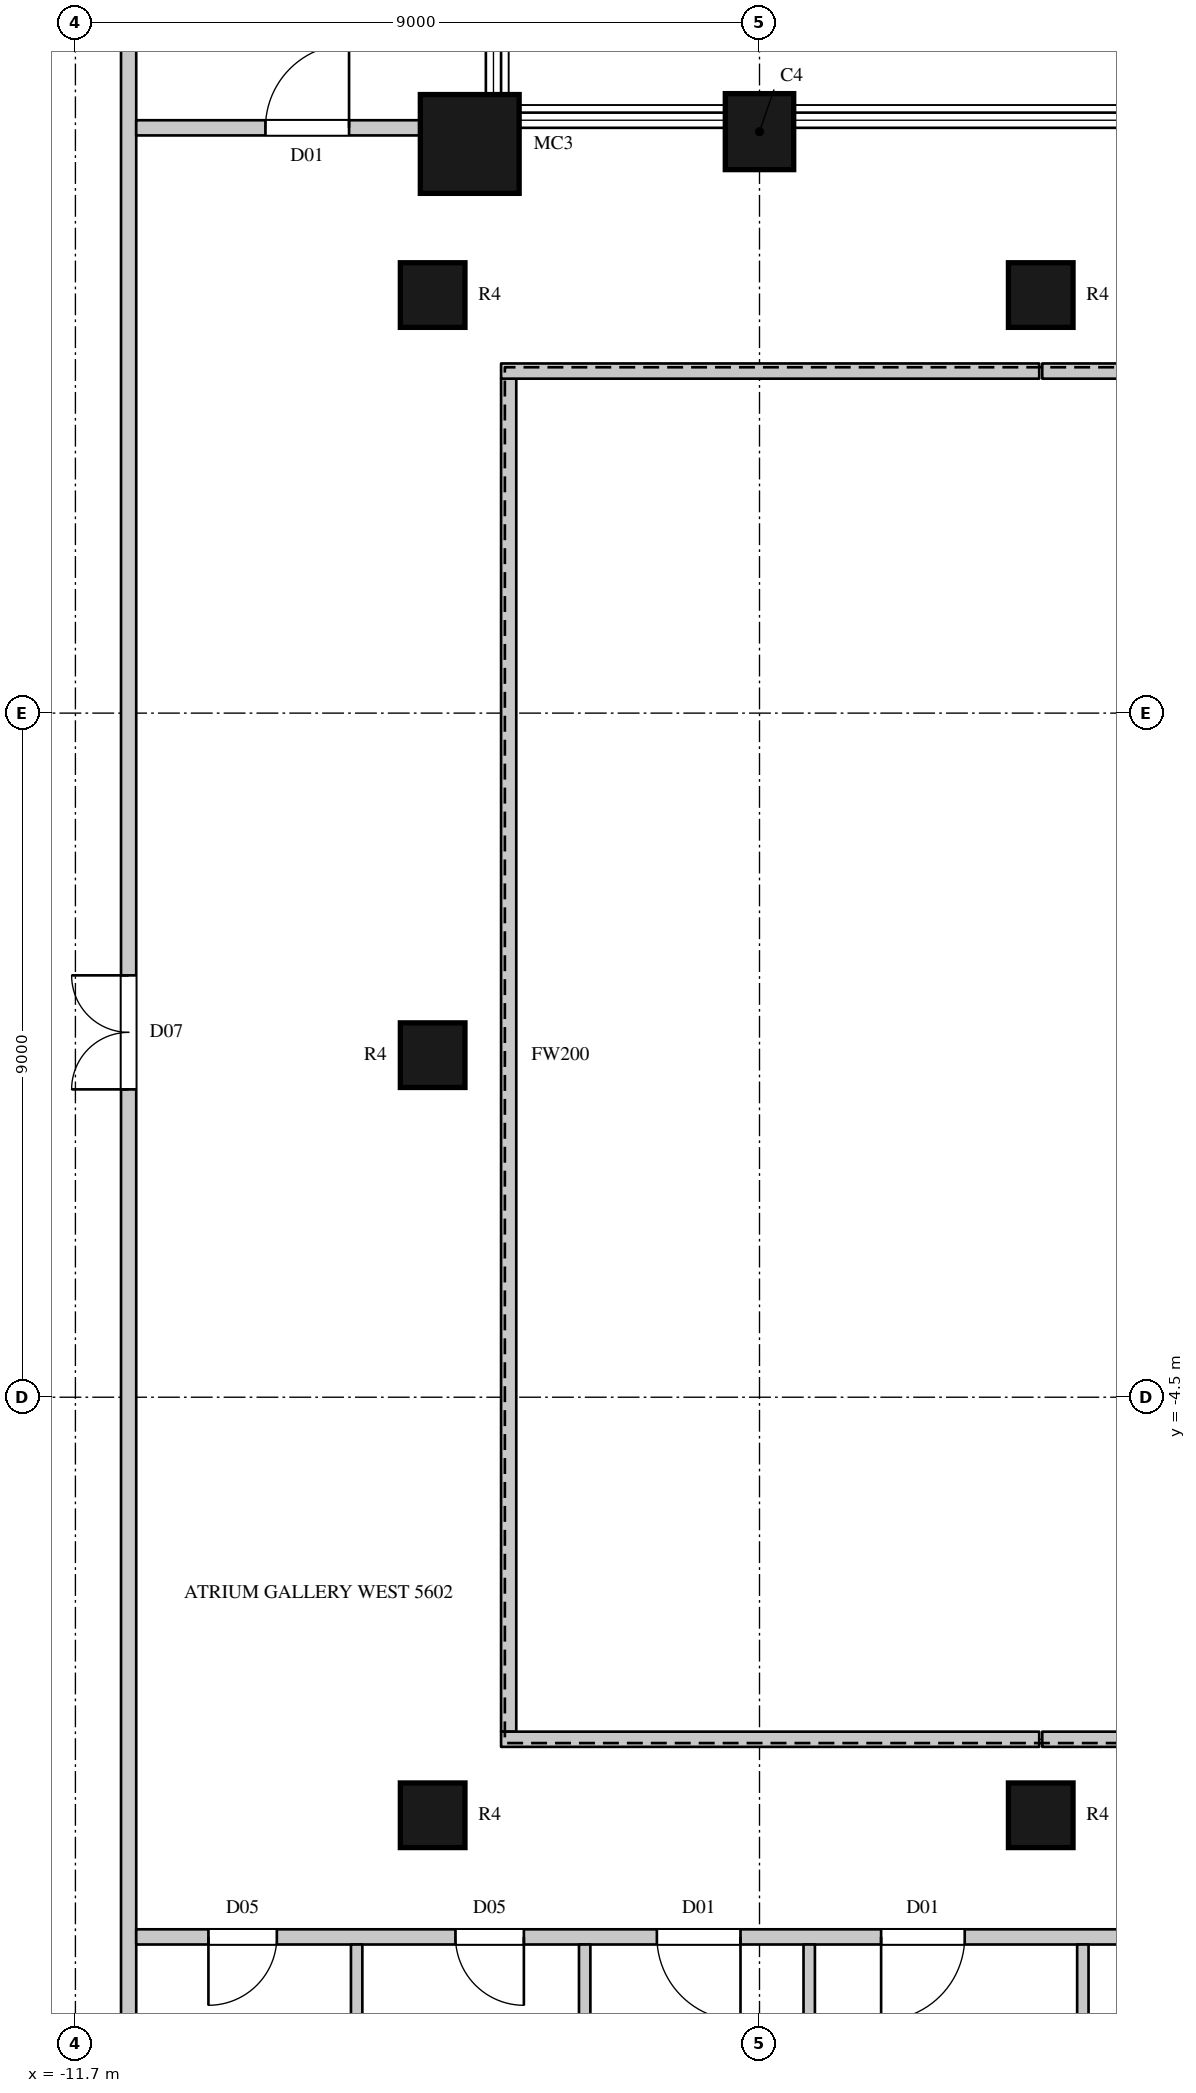
"""IFC4 building model, lengths in metres.
Left out: names, types, materials, properties, quantities, classifications, styles, units other than length and angle.
Written with IfcOpenShell. Run it as: python <this file> out.ifc"""

import sys

from ifc_helpers import new_model, si_unit, direction, frame, frame_2d, origin, origin_2d, place, context, subcontext, project, spatial, rectangle, circle, extrude, element, fill, save


model = new_model("IFC4")
c1 = context("Model", 3, precision=1e-05, world=origin(), true_north=direction((0.0, 1.0)))
c2 = subcontext(c1, "Body", "Model", "MODEL_VIEW")
j1 = project(units=[si_unit("LENGTHUNIT", "METRE"), si_unit("PLANEANGLEUNIT", "RADIAN")], contexts=[c1])
p1 = place(None, origin())
s1 = spatial("IfcSite", under=j1, at=p1, CompositionType="ELEMENT")
p2 = place(p1, origin())
s2 = spatial("IfcBuilding", under=s1, at=p2, CompositionType="ELEMENT")
p3 = place(p2, frame((0.0, 0.0, 251.6)))
s3 = spatial("IfcBuildingStorey", under=s2, at=p3, CompositionType="ELEMENT", Elevation=251.6)
p4 = place(p3, frame((-2.7, 12.15, 0.0), z_axis=(0.0, 0.0, 1.0), x_axis=(-1.0, 0.0, 0.0)))
e1 = element("IfcColumn", 1, at=p4, inside=s3, PredefinedType="COLUMN", context=c2, shape_type="SweptSolid", body=[
    extrude(rectangle(XDim=0.9, YDim=1.0, at=origin_2d()), origin(), (0.0, 0.0, 1.0), 4.1),
])
p5 = place(p3, frame((-6.512, 11.988, 0.0), z_axis=(0.0, 0.0, 1.0), x_axis=(1.0, 0.0, 0.0)))
e2 = element("IfcColumn", 2, at=p5, inside=s3, PredefinedType="COLUMN", context=c2, shape_type="SweptSolid", body=[
    extrude(circle(Radius=0.65, at=origin_2d()), origin(), (0.0, 0.0, 1.0), 4.1),
])
for number, where, z_axis, x_axis in (
    (3, (-7.0, -10.0, 0.0), (0.0, 0.0, 1.0), (1.0, 0.0, 0.0)),
    (4, (-7.0, 0.0, 0.0), (0.0, 0.0, 1.0), (1.0, 0.0, 0.0)),
    (5, (-7.0, 10.0, 0.0), (0.0, 0.0, 1.0), (1.0, 0.0, 0.0)),
    (6, (1.0, -10.0, 0.0), (0.0, 0.0, 1.0), (1.0, 0.0, 0.0)),
    (7, (1.0, 10.0, 0.0), (0.0, 0.0, 1.0), (1.0, 0.0, 0.0)),
):
    element("IfcColumn", number, at=place(p3, frame(where, z_axis=z_axis, x_axis=x_axis)), inside=s3, PredefinedType="COLUMN", context=c2, shape_type="SweptSolid", body=[
        extrude(circle(Radius=0.425, at=origin_2d()), origin(), (0.0, 0.0, 1.0), 4.1),
    ])
p6 = place(p3, frame((-11.0, -14.8, 0.0), z_axis=(0.0, 0.0, 1.0), x_axis=(0.0, 1.0, 0.0)))
e8 = element("IfcWall", 8, at=p6, inside=s3, PredefinedType="PARTITIONING", context=c2, shape_type="SweptSolid", body=[
    extrude(rectangle(XDim=29.6, YDim=0.2, at=frame_2d((14.8, 0.0))), origin(), (0.0, 0.0, 1.0), 3.8),
])
p7 = place(p6, frame((14.35, 0.0, 0.0)))
e9 = element("IfcOpeningElement", 9, at=p7, cuts=e8, PredefinedType="OPENING", context=c2, shape_type="SweptSolid", body=[
    extrude(rectangle(XDim=1.5, YDim=2.4, at=frame_2d((0.75, 1.2))), frame((0.0, 0.11, 0.0), z_axis=(0.0, -1.0, 0.0), x_axis=(1.0, 0.0, 0.0)), (0.0, 0.0, 1.0), 0.22),
])
p8 = place(p3, frame((-10.9, -11.6, 0.0), z_axis=(0.0, 0.0, 1.0), x_axis=(1.0, 0.0, 0.0)))
e10 = element("IfcWall", 10, at=p8, inside=s3, PredefinedType="PARTITIONING", context=c2, shape_type="SweptSolid", body=[
    extrude(rectangle(XDim=21.4, YDim=0.2, at=frame_2d((10.7, 0.0))), origin(), (0.0, 0.0, 1.0), 3.8),
])
p9 = place(p8, frame((0.95, 0.0, 0.0)))
e11 = element("IfcOpeningElement", 11, at=p9, cuts=e10, PredefinedType="OPENING", context=c2, shape_type="SweptSolid", body=[
    extrude(rectangle(XDim=0.9, YDim=2.2, at=frame_2d((0.45, 1.1))), frame((0.0, 0.11, 0.0), z_axis=(0.0, -1.0, 0.0), x_axis=(1.0, 0.0, 0.0)), (0.0, 0.0, 1.0), 0.22),
])
p10 = place(p8, frame((4.2, 0.0, 0.0)))
e12 = element("IfcOpeningElement", 12, at=p10, cuts=e10, PredefinedType="OPENING", context=c2, shape_type="SweptSolid", body=[
    extrude(rectangle(XDim=0.9, YDim=2.2, at=frame_2d((0.45, 1.1))), frame((0.0, 0.11, 0.0), z_axis=(0.0, -1.0, 0.0), x_axis=(1.0, 0.0, 0.0)), (0.0, 0.0, 1.0), 0.22),
])
p11 = place(p8, frame((6.85, 0.0, 0.0)))
e13 = element("IfcOpeningElement", 13, at=p11, cuts=e10, PredefinedType="OPENING", context=c2, shape_type="SweptSolid", body=[
    extrude(rectangle(XDim=1.1, YDim=2.4, at=frame_2d((0.55, 1.2))), frame((0.0, 0.11, 0.0), z_axis=(0.0, -1.0, 0.0), x_axis=(1.0, 0.0, 0.0)), (0.0, 0.0, 1.0), 0.22),
])
p12 = place(p8, frame((9.8, 0.0, 0.0)))
e14 = element("IfcOpeningElement", 14, at=p12, cuts=e10, PredefinedType="OPENING", context=c2, shape_type="SweptSolid", body=[
    extrude(rectangle(XDim=1.1, YDim=2.4, at=frame_2d((0.55, 1.2))), frame((0.0, 0.11, 0.0), z_axis=(0.0, -1.0, 0.0), x_axis=(1.0, 0.0, 0.0)), (0.0, 0.0, 1.0), 0.22),
])
p13 = place(p3, frame((-10.9, 12.2, 0.0), z_axis=(0.0, 0.0, 1.0), x_axis=(1.0, 0.0, 0.0)))
e15 = element("IfcWall", 15, at=p13, inside=s3, PredefinedType="PARTITIONING", context=c2, shape_type="SweptSolid", body=[
    extrude(rectangle(XDim=3.756, YDim=0.2, at=frame_2d((1.878, 0.0))), origin(), (0.0, 0.0, 1.0), 3.8),
])
p14 = place(p13, frame((1.7, 0.0, 0.0)))
e16 = element("IfcOpeningElement", 16, at=p14, cuts=e15, PredefinedType="OPENING", context=c2, shape_type="SweptSolid", body=[
    extrude(rectangle(XDim=1.1, YDim=2.4, at=frame_2d((0.55, 1.2))), frame((0.0, 0.11, 0.0), z_axis=(0.0, -1.0, 0.0), x_axis=(1.0, 0.0, 0.0)), (0.0, 0.0, 1.0), 0.22),
])
p15 = place(p3, frame((-6.0, -8.9, 0.0), z_axis=(0.0, 0.0, 1.0), x_axis=(0.0, 1.0, 0.0)))
e17 = element("IfcWall", 17, at=p15, inside=s3, PredefinedType="PARTITIONING", context=c2, shape_type="SweptSolid", body=[
    extrude(rectangle(XDim=17.8, YDim=0.2, at=frame_2d((8.9, 0.0))), origin(), (0.0, 0.0, 1.0), 3.8),
])
for number, where, z_axis, x_axis in (
    (18, (-6.1, -9.0, 0.0), (0.0, 0.0, 1.0), (1.0, 0.0, 0.0)),
    (19, (-6.1, 9.0, 0.0), (0.0, 0.0, 1.0), (1.0, 0.0, 0.0)),
    (20, (1.02, -9.0, 0.0), (0.0, 0.0, 1.0), (1.0, 0.0, 0.0)),
    (21, (1.02, 9.0, 0.0), (0.0, 0.0, 1.0), (1.0, 0.0, 0.0)),
):
    element("IfcWall", number, at=place(p3, frame(where, z_axis=z_axis, x_axis=x_axis)), inside=s3, PredefinedType="PARTITIONING", context=c2, shape_type="SweptSolid", body=[
        extrude(rectangle(XDim=7.08, YDim=0.2, at=frame_2d((3.54, 0.0))), origin(), (0.0, 0.0, 1.0), 3.8),
    ])
for number, where, z_axis, x_axis in (
    (22, (-8.0, -24.04, 0.0), (0.0, 0.0, 1.0), (0.0, 1.0, 0.0)),
    (23, (-5.0, -24.04, 0.0), (0.0, 0.0, 1.0), (0.0, 1.0, 0.0)),
):
    element("IfcWall", number, at=place(p3, frame(where, z_axis=z_axis, x_axis=x_axis)), inside=s3, PredefinedType="PARTITIONING", context=c2, shape_type="SweptSolid", body=[
        extrude(rectangle(XDim=12.34, YDim=0.15, at=frame_2d((6.17, 0.0))), origin(), (0.0, 0.0, 1.0), 3.8),
    ])
p16 = place(p3, frame((-2.046, -23.441, 0.0), z_axis=(0.0, 0.0, 1.0), x_axis=(0.0, 1.0, 0.0)))
e24 = element("IfcWall", 24, at=p16, inside=s3, PredefinedType="PARTITIONING", context=c2, shape_type="SweptSolid", body=[
    extrude(rectangle(XDim=11.741, YDim=0.15, at=frame_2d((5.871, 0.0))), origin(), (0.0, 0.0, 1.0), 3.8),
])
p17 = place(p3, frame((1.554, -15.425, 0.0), z_axis=(0.0, 0.0, 1.0), x_axis=(0.0, 1.0, 0.0)))
e25 = element("IfcWall", 25, at=p17, inside=s3, PredefinedType="PARTITIONING", context=c2, shape_type="SweptSolid", body=[
    extrude(rectangle(XDim=3.725, YDim=0.15, at=frame_2d((1.863, 0.0))), origin(), (0.0, 0.0, 1.0), 3.8),
])
p18 = place(p17, frame((0.15, 0.0, 0.0)))
e26 = element("IfcOpeningElement", 26, at=p18, cuts=e25, PredefinedType="OPENING", context=c2, shape_type="SweptSolid", body=[
    extrude(rectangle(XDim=0.95, YDim=2.2, at=frame_2d((0.475, 1.1))), frame((0.0, 0.085, 0.0), z_axis=(0.0, -1.0, 0.0), x_axis=(1.0, 0.0, 0.0)), (0.0, 0.0, 1.0), 0.17),
])
p19 = place(p7, origin())
e27 = element("IfcDoor", 27, at=p19, inside=s3, OperationType="DOUBLE_DOOR_SINGLE_SWING", PredefinedType="DOOR", context=c2, shape_type="SweptSolid", body=[
    extrude(rectangle(XDim=1.5, YDim=2.4, at=frame_2d((0.75, 1.2))), frame((0.0, 0.025, 0.0), z_axis=(0.0, -1.0, 0.0), x_axis=(1.0, 0.0, 0.0)), (0.0, 0.0, 1.0), 0.05),
])
fill(e9, e27)
p20 = place(p9, origin())
e28 = element("IfcDoor", 28, at=p20, inside=s3, OperationType="SINGLE_SWING_RIGHT", PredefinedType="DOOR", context=c2, shape_type="SweptSolid", body=[
    extrude(rectangle(XDim=0.9, YDim=2.2, at=frame_2d((0.45, 1.1))), frame((0.0, 0.025, 0.0), z_axis=(0.0, -1.0, 0.0), x_axis=(1.0, 0.0, 0.0)), (0.0, 0.0, 1.0), 0.05),
])
fill(e11, e28)
p21 = place(p10, origin())
e29 = element("IfcDoor", 29, at=p21, inside=s3, OperationType="SINGLE_SWING_LEFT", PredefinedType="DOOR", context=c2, shape_type="SweptSolid", body=[
    extrude(rectangle(XDim=0.9, YDim=2.2, at=frame_2d((0.45, 1.1))), frame((0.0, 0.025, 0.0), z_axis=(0.0, -1.0, 0.0), x_axis=(1.0, 0.0, 0.0)), (0.0, 0.0, 1.0), 0.05),
])
fill(e12, e29)
p22 = place(p14, origin())
e30 = element("IfcDoor", 30, at=p22, inside=s3, OperationType="SINGLE_SWING_RIGHT", PredefinedType="DOOR", context=c2, shape_type="SweptSolid", body=[
    extrude(rectangle(XDim=1.1, YDim=2.4, at=frame_2d((0.55, 1.2))), frame((0.0, 0.025, 0.0), z_axis=(0.0, -1.0, 0.0), x_axis=(1.0, 0.0, 0.0)), (0.0, 0.0, 1.0), 0.05),
])
fill(e16, e30)
p23 = place(p11, origin())
e31 = element("IfcDoor", 31, at=p23, inside=s3, OperationType="SINGLE_SWING_LEFT", PredefinedType="DOOR", context=c2, shape_type="SweptSolid", body=[
    extrude(rectangle(XDim=1.1, YDim=2.4, at=frame_2d((0.55, 1.2))), frame((0.0, 0.025, 0.0), z_axis=(0.0, -1.0, 0.0), x_axis=(1.0, 0.0, 0.0)), (0.0, 0.0, 1.0), 0.05),
])
fill(e13, e31)
p24 = place(p12, origin())
e32 = element("IfcDoor", 32, at=p24, inside=s3, OperationType="SINGLE_SWING_RIGHT", PredefinedType="DOOR", context=c2, shape_type="SweptSolid", body=[
    extrude(rectangle(XDim=1.1, YDim=2.4, at=frame_2d((0.55, 1.2))), frame((0.0, 0.025, 0.0), z_axis=(0.0, -1.0, 0.0), x_axis=(1.0, 0.0, 0.0)), (0.0, 0.0, 1.0), 0.05),
])
fill(e14, e32)
save(model, sys.argv[1])
